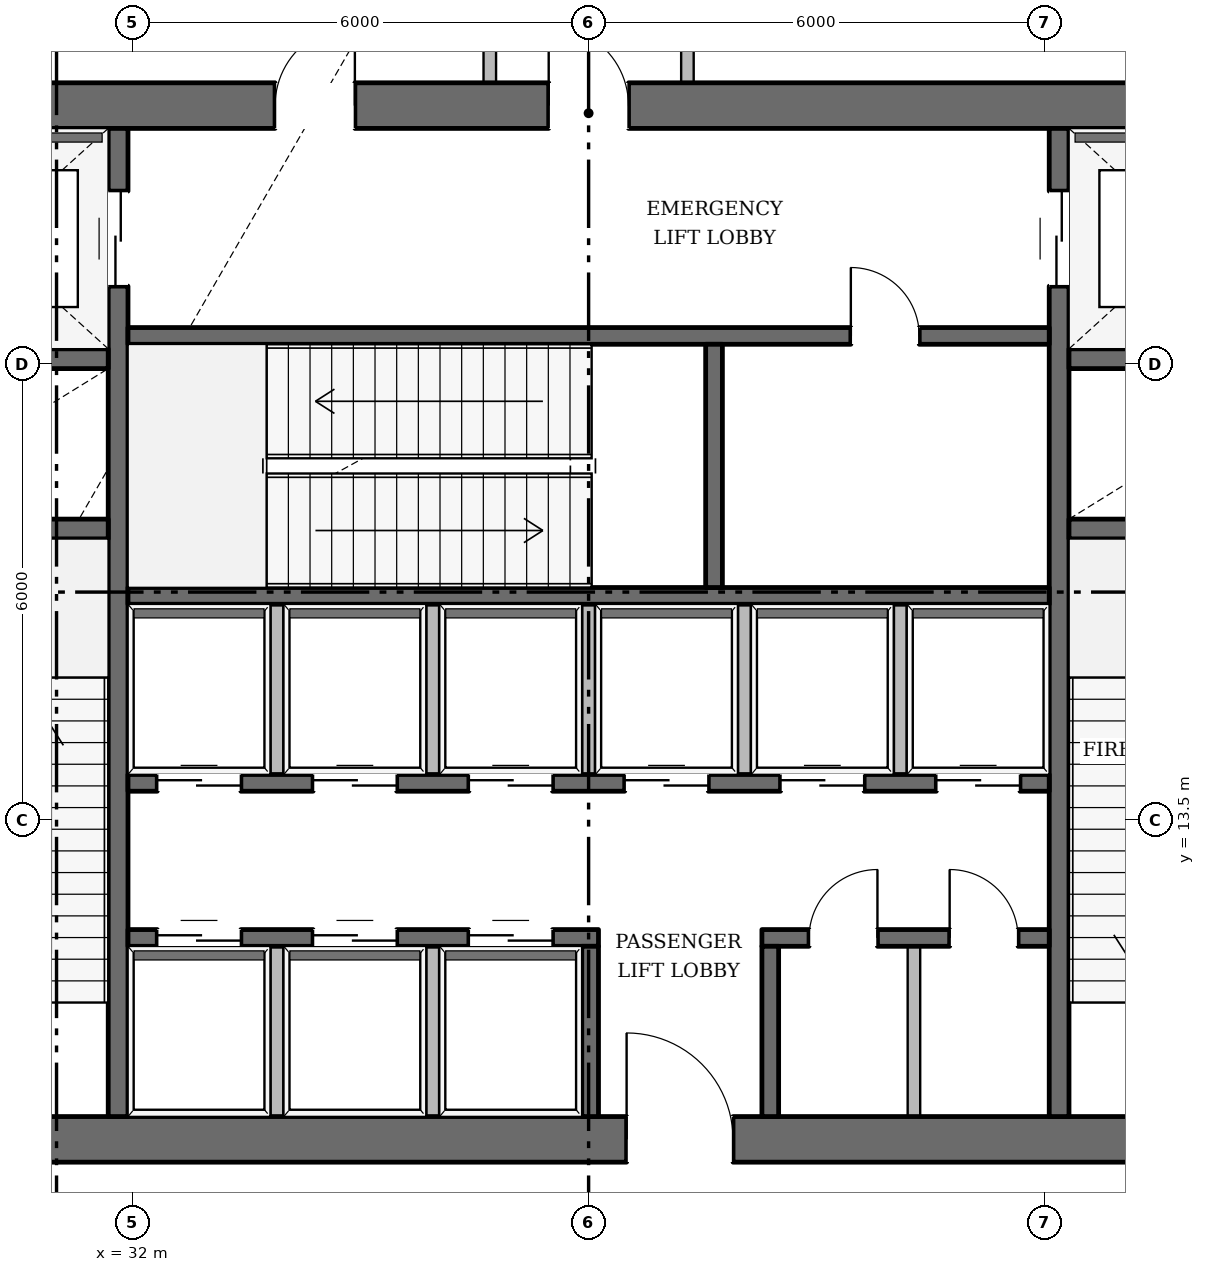
"""IFC4 building model, lengths in metres.
Left out: names, types, materials, properties, quantities, classifications, styles, units other than length and angle.
Written with IfcOpenShell. Run it as: python <this file> out.ifc"""

import sys

from ifc_helpers import new_model, si_unit, direction, frame, frame_2d, origin, place, context, subcontext, project, spatial, rectangle, extrude, element, fill, save


model = new_model("IFC4")
c1 = context("Model", 3, precision=1e-05, world=origin(), true_north=direction((0.0, 1.0)))
c2 = subcontext(c1, "Body", "Model", "MODEL_VIEW")
j1 = project(units=[si_unit("LENGTHUNIT", "METRE"), si_unit("PLANEANGLEUNIT", "RADIAN")], contexts=[c1])
p1 = place(None, origin())
s1 = spatial("IfcSite", under=j1, at=p1, CompositionType="ELEMENT")
p2 = place(p1, origin())
s2 = spatial("IfcBuilding", under=s1, at=p2, CompositionType="ELEMENT")
p3 = place(p2, origin())
s3 = spatial("IfcBuildingStorey", under=s2, at=p3, CompositionType="ELEMENT", Elevation=0.0)
p4 = place(p3, frame((27.88, 9.3, 0.0), z_axis=(0.0, 0.0, 1.0), x_axis=(1.0, 0.0, 0.0)))
e1 = element("IfcWall", 1, at=p4, inside=s3, PredefinedType="SOLIDWALL", context=c2, shape_type="SweptSolid", body=[
    extrude(rectangle(XDim=20.24, YDim=0.6, at=frame_2d((10.12, 0.0))), origin(), (0.0, 0.0, 1.0), 5.74),
])
p5 = place(p4, frame((10.62, 0.0, 0.0)))
e2 = element("IfcOpeningElement", 2, at=p5, cuts=e1, PredefinedType="OPENING", context=c2, shape_type="SweptSolid", body=[
    extrude(rectangle(XDim=1.4, YDim=2.2, at=frame_2d((0.7, 1.1))), frame((0.0, 0.31, 0.0), z_axis=(0.0, -1.0, 0.0), x_axis=(1.0, 0.0, 0.0)), (0.0, 0.0, 1.0), 0.62),
])
p6 = place(p3, frame((27.88, 22.9, 0.0), z_axis=(0.0, 0.0, 1.0), x_axis=(1.0, 0.0, 0.0)))
e3 = element("IfcWall", 3, at=p6, inside=s3, PredefinedType="SOLIDWALL", context=c2, shape_type="SweptSolid", body=[
    extrude(rectangle(XDim=20.24, YDim=0.6, at=frame_2d((10.12, 0.0))), origin(), (0.0, 0.0, 1.0), 5.74),
])
p7 = place(p6, frame((9.595, 0.0, 0.0)))
e4 = element("IfcOpeningElement", 4, at=p7, cuts=e3, PredefinedType="OPENING", context=c2, shape_type="SweptSolid", body=[
    extrude(rectangle(XDim=1.05, YDim=2.15, at=frame_2d((0.525, 1.075))), frame((0.0, 0.31, 0.0), z_axis=(0.0, -1.0, 0.0), x_axis=(1.0, 0.0, 0.0)), (0.0, 0.0, 1.0), 0.62),
])
p8 = place(p6, frame((5.995, 0.0, 0.0)))
e5 = element("IfcOpeningElement", 5, at=p8, cuts=e3, PredefinedType="OPENING", context=c2, shape_type="SweptSolid", body=[
    extrude(rectangle(XDim=1.05, YDim=2.15, at=frame_2d((0.525, 1.075))), frame((0.0, 0.31, 0.0), z_axis=(0.0, -1.0, 0.0), x_axis=(1.0, 0.0, 0.0)), (0.0, 0.0, 1.0), 0.62),
])
p9 = place(p3, frame((31.81, 9.6, 0.0), z_axis=(0.0, 0.0, 1.0), x_axis=(0.0, 1.0, 0.0)))
e6 = element("IfcWall", 6, at=p9, inside=s3, PredefinedType="SHEAR", context=c2, shape_type="SweptSolid", body=[
    extrude(rectangle(XDim=13.0, YDim=0.26, at=frame_2d((6.5, 0.0))), origin(), (0.0, 0.0, 1.0), 5.74),
])
p10 = place(p9, frame((10.925, 0.0, 0.0)))
e7 = element("IfcOpeningElement", 7, at=p10, cuts=e6, PredefinedType="OPENING", context=c2, shape_type="SweptSolid", body=[
    extrude(rectangle(XDim=1.25, YDim=2.25, at=frame_2d((0.625, 1.125))), frame((0.0, 0.14, 0.0), z_axis=(0.0, -1.0, 0.0), x_axis=(1.0, 0.0, 0.0)), (0.0, 0.0, 1.0), 0.28),
])
p11 = place(p3, frame((44.19, 9.6, 0.0), z_axis=(0.0, 0.0, 1.0), x_axis=(0.0, 1.0, 0.0)))
e8 = element("IfcWall", 8, at=p11, inside=s3, PredefinedType="SHEAR", context=c2, shape_type="SweptSolid", body=[
    extrude(rectangle(XDim=13.0, YDim=0.26, at=frame_2d((6.5, 0.0))), origin(), (0.0, 0.0, 1.0), 5.74),
])
p12 = place(p11, frame((10.925, 0.0, 0.0)))
e9 = element("IfcOpeningElement", 9, at=p12, cuts=e8, PredefinedType="OPENING", context=c2, shape_type="SweptSolid", body=[
    extrude(rectangle(XDim=1.25, YDim=2.25, at=frame_2d((0.625, 1.125))), frame((0.0, 0.14, 0.0), z_axis=(0.0, -1.0, 0.0), x_axis=(1.0, 0.0, 0.0)), (0.0, 0.0, 1.0), 0.28),
])
for number, where, z_axis, x_axis in (
    (10, (28.48, 17.33, 0.0), (0.0, 0.0, 1.0), (1.0, 0.0, 0.0)),
    (11, (28.48, 19.57, 0.0), (0.0, 0.0, 1.0), (1.0, 0.0, 0.0)),
    (12, (44.32, 17.33, 0.0), (0.0, 0.0, 1.0), (1.0, 0.0, 0.0)),
    (13, (44.32, 19.57, 0.0), (0.0, 0.0, 1.0), (1.0, 0.0, 0.0)),
):
    element("IfcWall", number, at=place(p3, frame(where, z_axis=z_axis, x_axis=x_axis)), inside=s3, PredefinedType="SHEAR", context=c2, shape_type="SweptSolid", body=[
        extrude(rectangle(XDim=3.2, YDim=0.26, at=frame_2d((1.6, 0.0))), origin(), (0.0, 0.0, 1.0), 5.74),
    ])
p13 = place(p3, frame((31.94, 19.87, 0.0), z_axis=(0.0, 0.0, 1.0), x_axis=(1.0, 0.0, 0.0)))
e14 = element("IfcWall", 14, at=p13, inside=s3, PredefinedType="SOLIDWALL", context=c2, shape_type="SweptSolid", body=[
    extrude(rectangle(XDim=12.12, YDim=0.22, at=frame_2d((6.06, 0.0))), origin(), (0.0, 0.0, 1.0), 5.74),
])
p14 = place(p13, frame((9.51, 0.0, 0.0)))
e15 = element("IfcOpeningElement", 15, at=p14, cuts=e14, PredefinedType="OPENING", context=c2, shape_type="SweptSolid", body=[
    extrude(rectangle(XDim=0.9, YDim=2.1, at=frame_2d((0.45, 1.05))), frame((0.0, 0.12, 0.0), z_axis=(0.0, -1.0, 0.0), x_axis=(1.0, 0.0, 0.0)), (0.0, 0.0, 1.0), 0.24),
])
p15 = place(p3, frame((31.94, 16.45, 0.0), z_axis=(0.0, 0.0, 1.0), x_axis=(1.0, 0.0, 0.0)))
e16 = element("IfcWall", 16, at=p15, inside=s3, PredefinedType="SOLIDWALL", context=c2, shape_type="SweptSolid", body=[
    extrude(rectangle(XDim=12.12, YDim=0.22, at=frame_2d((6.06, 0.0))), origin(), (0.0, 0.0, 1.0), 5.74),
])
p16 = place(p3, frame((39.65, 16.56, 0.0), z_axis=(0.0, 0.0, 1.0), x_axis=(0.0, 1.0, 0.0)))
e17 = element("IfcWall", 17, at=p16, inside=s3, PredefinedType="SOLIDWALL", context=c2, shape_type="SweptSolid", body=[
    extrude(rectangle(XDim=3.2, YDim=0.22, at=frame_2d((1.6, 0.0))), origin(), (0.0, 0.0, 1.0), 5.74),
])
p17 = place(p3, frame((31.94, 13.99, 0.0), z_axis=(0.0, 0.0, 1.0), x_axis=(1.0, 0.0, 0.0)))
e18 = element("IfcWall", 18, at=p17, inside=s3, PredefinedType="SOLIDWALL", context=c2, shape_type="SweptSolid", body=[
    extrude(rectangle(XDim=12.12, YDim=0.22, at=frame_2d((6.06, 0.0))), origin(), (0.0, 0.0, 1.0), 5.74),
])
p18 = place(p17, frame((0.385, 0.0, 0.0)))
e19 = element("IfcOpeningElement", 19, at=p18, cuts=e18, PredefinedType="OPENING", context=c2, shape_type="SweptSolid", body=[
    extrude(rectangle(XDim=1.1, YDim=2.2, at=frame_2d((0.55, 1.1))), frame((0.0, 0.12, 0.0), z_axis=(0.0, -1.0, 0.0), x_axis=(1.0, 0.0, 0.0)), (0.0, 0.0, 1.0), 0.24),
])
p19 = place(p17, frame((2.435, 0.0, 0.0)))
e20 = element("IfcOpeningElement", 20, at=p19, cuts=e18, PredefinedType="OPENING", context=c2, shape_type="SweptSolid", body=[
    extrude(rectangle(XDim=1.1, YDim=2.2, at=frame_2d((0.55, 1.1))), frame((0.0, 0.12, 0.0), z_axis=(0.0, -1.0, 0.0), x_axis=(1.0, 0.0, 0.0)), (0.0, 0.0, 1.0), 0.24),
])
p20 = place(p17, frame((4.485, 0.0, 0.0)))
e21 = element("IfcOpeningElement", 21, at=p20, cuts=e18, PredefinedType="OPENING", context=c2, shape_type="SweptSolid", body=[
    extrude(rectangle(XDim=1.1, YDim=2.2, at=frame_2d((0.55, 1.1))), frame((0.0, 0.12, 0.0), z_axis=(0.0, -1.0, 0.0), x_axis=(1.0, 0.0, 0.0)), (0.0, 0.0, 1.0), 0.24),
])
p21 = place(p17, frame((6.535, 0.0, 0.0)))
e22 = element("IfcOpeningElement", 22, at=p21, cuts=e18, PredefinedType="OPENING", context=c2, shape_type="SweptSolid", body=[
    extrude(rectangle(XDim=1.1, YDim=2.2, at=frame_2d((0.55, 1.1))), frame((0.0, 0.12, 0.0), z_axis=(0.0, -1.0, 0.0), x_axis=(1.0, 0.0, 0.0)), (0.0, 0.0, 1.0), 0.24),
])
p22 = place(p17, frame((8.585, 0.0, 0.0)))
e23 = element("IfcOpeningElement", 23, at=p22, cuts=e18, PredefinedType="OPENING", context=c2, shape_type="SweptSolid", body=[
    extrude(rectangle(XDim=1.1, YDim=2.2, at=frame_2d((0.55, 1.1))), frame((0.0, 0.12, 0.0), z_axis=(0.0, -1.0, 0.0), x_axis=(1.0, 0.0, 0.0)), (0.0, 0.0, 1.0), 0.24),
])
p23 = place(p17, frame((10.635, 0.0, 0.0)))
e24 = element("IfcOpeningElement", 24, at=p23, cuts=e18, PredefinedType="OPENING", context=c2, shape_type="SweptSolid", body=[
    extrude(rectangle(XDim=1.1, YDim=2.2, at=frame_2d((0.55, 1.1))), frame((0.0, 0.12, 0.0), z_axis=(0.0, -1.0, 0.0), x_axis=(1.0, 0.0, 0.0)), (0.0, 0.0, 1.0), 0.24),
])
p24 = place(p3, frame((31.94, 11.95, 0.0), z_axis=(0.0, 0.0, 1.0), x_axis=(1.0, 0.0, 0.0)))
e25 = element("IfcWall", 25, at=p24, inside=s3, PredefinedType="SOLIDWALL", context=c2, shape_type="SweptSolid", body=[
    extrude(rectangle(XDim=6.19, YDim=0.22, at=frame_2d((3.095, 0.0))), origin(), (0.0, 0.0, 1.0), 5.74),
])
p25 = place(p24, frame((0.385, 0.0, 0.0)))
e26 = element("IfcOpeningElement", 26, at=p25, cuts=e25, PredefinedType="OPENING", context=c2, shape_type="SweptSolid", body=[
    extrude(rectangle(XDim=1.1, YDim=2.2, at=frame_2d((0.55, 1.1))), frame((0.0, 0.12, 0.0), z_axis=(0.0, -1.0, 0.0), x_axis=(1.0, 0.0, 0.0)), (0.0, 0.0, 1.0), 0.24),
])
p26 = place(p24, frame((2.435, 0.0, 0.0)))
e27 = element("IfcOpeningElement", 27, at=p26, cuts=e25, PredefinedType="OPENING", context=c2, shape_type="SweptSolid", body=[
    extrude(rectangle(XDim=1.1, YDim=2.2, at=frame_2d((0.55, 1.1))), frame((0.0, 0.12, 0.0), z_axis=(0.0, -1.0, 0.0), x_axis=(1.0, 0.0, 0.0)), (0.0, 0.0, 1.0), 0.24),
])
p27 = place(p24, frame((4.485, 0.0, 0.0)))
e28 = element("IfcOpeningElement", 28, at=p27, cuts=e25, PredefinedType="OPENING", context=c2, shape_type="SweptSolid", body=[
    extrude(rectangle(XDim=1.1, YDim=2.2, at=frame_2d((0.55, 1.1))), frame((0.0, 0.12, 0.0), z_axis=(0.0, -1.0, 0.0), x_axis=(1.0, 0.0, 0.0)), (0.0, 0.0, 1.0), 0.24),
])
p28 = place(p3, frame((40.28, 11.95, 0.0), z_axis=(0.0, 0.0, 1.0), x_axis=(1.0, 0.0, 0.0)))
e29 = element("IfcWall", 29, at=p28, inside=s3, PredefinedType="SOLIDWALL", context=c2, shape_type="SweptSolid", body=[
    extrude(rectangle(XDim=3.78, YDim=0.22, at=frame_2d((1.89, 0.0))), origin(), (0.0, 0.0, 1.0), 5.74),
])
p29 = place(p28, frame((0.62, 0.0, 0.0)))
e30 = element("IfcOpeningElement", 30, at=p29, cuts=e29, PredefinedType="OPENING", context=c2, shape_type="SweptSolid", body=[
    extrude(rectangle(XDim=0.9, YDim=2.1, at=frame_2d((0.45, 1.05))), frame((0.0, 0.12, 0.0), z_axis=(0.0, -1.0, 0.0), x_axis=(1.0, 0.0, 0.0)), (0.0, 0.0, 1.0), 0.24),
])
p30 = place(p28, frame((2.47, 0.0, 0.0)))
e31 = element("IfcOpeningElement", 31, at=p30, cuts=e29, PredefinedType="OPENING", context=c2, shape_type="SweptSolid", body=[
    extrude(rectangle(XDim=0.9, YDim=2.1, at=frame_2d((0.45, 1.05))), frame((0.0, 0.12, 0.0), z_axis=(0.0, -1.0, 0.0), x_axis=(1.0, 0.0, 0.0)), (0.0, 0.0, 1.0), 0.24),
])
for number, where, z_axis, x_axis in (
    (32, (38.02, 9.6, 0.0), (0.0, 0.0, 1.0), (0.0, 1.0, 0.0)),
    (33, (40.39, 9.6, 0.0), (0.0, 0.0, 1.0), (0.0, 1.0, 0.0)),
):
    element("IfcWall", number, at=place(p3, frame(where, z_axis=z_axis, x_axis=x_axis)), inside=s3, PredefinedType="SOLIDWALL", context=c2, shape_type="SweptSolid", body=[
        extrude(rectangle(XDim=2.24, YDim=0.22, at=frame_2d((1.12, 0.0))), origin(), (0.0, 0.0, 1.0), 5.74),
    ])
for number, where, z_axis, x_axis in (
    (34, (33.9, 9.6, 0.0), (0.0, 0.0, 1.0), (0.0, 1.0, 0.0)),
    (35, (35.95, 9.6, 0.0), (0.0, 0.0, 1.0), (0.0, 1.0, 0.0)),
    (36, (33.9, 14.1, 0.0), (0.0, 0.0, 1.0), (0.0, 1.0, 0.0)),
    (37, (35.95, 14.1, 0.0), (0.0, 0.0, 1.0), (0.0, 1.0, 0.0)),
    (38, (38.0, 14.1, 0.0), (0.0, 0.0, 1.0), (0.0, 1.0, 0.0)),
    (39, (40.05, 14.1, 0.0), (0.0, 0.0, 1.0), (0.0, 1.0, 0.0)),
    (40, (42.1, 14.1, 0.0), (0.0, 0.0, 1.0), (0.0, 1.0, 0.0)),
    (41, (42.28, 9.6, 0.0), (0.0, 0.0, 1.0), (0.0, 1.0, 0.0)),
):
    element("IfcWall", number, at=place(p3, frame(where, z_axis=z_axis, x_axis=x_axis)), inside=s3, PredefinedType="PARTITIONING", context=c2, shape_type="SweptSolid", body=[
        extrude(rectangle(XDim=2.24, YDim=0.165, at=frame_2d((1.12, 0.0))), origin(), (0.0, 0.0, 1.0), 5.74),
    ])
p31 = place(p3, frame((36.7, 23.2, 0.0), z_axis=(0.0, 0.0, 1.0), x_axis=(0.0, 1.0, 0.0)))
e42 = element("IfcWall", 42, at=p31, inside=s3, PredefinedType="PARTITIONING", context=c2, shape_type="SweptSolid", body=[
    extrude(rectangle(XDim=20.216, YDim=0.165, at=frame_2d((10.108, 0.0))), origin(), (0.0, 0.0, 1.0), 5.74),
])
p32 = place(p31, frame((3.775, 0.0, 0.0)))
e43 = element("IfcOpeningElement", 43, at=p32, cuts=e42, PredefinedType="OPENING", context=c2, shape_type="SweptSolid", body=[
    extrude(rectangle(XDim=1.05, YDim=2.15, at=frame_2d((0.525, 1.075))), frame((0.0, 0.093, 0.0), z_axis=(0.0, -1.0, 0.0), x_axis=(1.0, 0.0, 0.0)), (0.0, 0.0, 1.0), 0.185),
])
p33 = place(p3, frame((39.3, 43.416, 0.0), z_axis=(0.0, 0.0, 1.0), x_axis=(0.0, -1.0, 0.0)))
e44 = element("IfcWall", 44, at=p33, inside=s3, PredefinedType="PARTITIONING", context=c2, shape_type="SweptSolid", body=[
    extrude(rectangle(XDim=20.216, YDim=0.165, at=frame_2d((10.108, 0.0))), origin(), (0.0, 0.0, 1.0), 5.74),
])
p34 = place(p33, frame((15.39, 0.0, 0.0)))
e45 = element("IfcOpeningElement", 45, at=p34, cuts=e44, PredefinedType="OPENING", context=c2, shape_type="SweptSolid", body=[
    extrude(rectangle(XDim=1.05, YDim=2.15, at=frame_2d((0.525, 1.075))), frame((0.0, 0.093, 0.0), z_axis=(0.0, -1.0, 0.0), x_axis=(1.0, 0.0, 0.0)), (0.0, 0.0, 1.0), 0.185),
])
p35 = place(p10, origin())
e46 = element("IfcDoor", 46, at=p35, inside=s3, OperationType="DOUBLE_DOOR_SLIDING", PredefinedType="DOOR", context=c2, shape_type="SweptSolid", body=[
    extrude(rectangle(XDim=1.25, YDim=2.25, at=frame_2d((0.625, 1.125))), frame((0.0, 0.025, 0.0), z_axis=(0.0, -1.0, 0.0), x_axis=(1.0, 0.0, 0.0)), (0.0, 0.0, 1.0), 0.05),
])
fill(e7, e46)
p36 = place(p12, origin())
e47 = element("IfcDoor", 47, at=p36, inside=s3, OperationType="DOUBLE_DOOR_SLIDING", PredefinedType="DOOR", context=c2, shape_type="SweptSolid", body=[
    extrude(rectangle(XDim=1.25, YDim=2.25, at=frame_2d((0.625, 1.125))), frame((0.0, 0.025, 0.0), z_axis=(0.0, -1.0, 0.0), x_axis=(1.0, 0.0, 0.0)), (0.0, 0.0, 1.0), 0.05),
])
fill(e9, e47)
p37 = place(p5, origin())
e48 = element("IfcDoor", 48, at=p37, inside=s3, OperationType="SINGLE_SWING_LEFT", PredefinedType="DOOR", context=c2, shape_type="SweptSolid", body=[
    extrude(rectangle(XDim=1.4, YDim=2.2, at=frame_2d((0.7, 1.1))), frame((0.0, 0.025, 0.0), z_axis=(0.0, -1.0, 0.0), x_axis=(1.0, 0.0, 0.0)), (0.0, 0.0, 1.0), 0.05),
])
fill(e2, e48)
p38 = place(p25, origin())
e49 = element("IfcDoor", 49, at=p38, inside=s3, OperationType="DOUBLE_DOOR_SLIDING", PredefinedType="DOOR", context=c2, shape_type="SweptSolid", body=[
    extrude(rectangle(XDim=1.1, YDim=2.2, at=frame_2d((0.55, 1.1))), frame((0.0, 0.025, 0.0), z_axis=(0.0, -1.0, 0.0), x_axis=(1.0, 0.0, 0.0)), (0.0, 0.0, 1.0), 0.05),
])
fill(e26, e49)
p39 = place(p26, origin())
e50 = element("IfcDoor", 50, at=p39, inside=s3, OperationType="DOUBLE_DOOR_SLIDING", PredefinedType="DOOR", context=c2, shape_type="SweptSolid", body=[
    extrude(rectangle(XDim=1.1, YDim=2.2, at=frame_2d((0.55, 1.1))), frame((0.0, 0.025, 0.0), z_axis=(0.0, -1.0, 0.0), x_axis=(1.0, 0.0, 0.0)), (0.0, 0.0, 1.0), 0.05),
])
fill(e27, e50)
p40 = place(p27, origin())
e51 = element("IfcDoor", 51, at=p40, inside=s3, OperationType="DOUBLE_DOOR_SLIDING", PredefinedType="DOOR", context=c2, shape_type="SweptSolid", body=[
    extrude(rectangle(XDim=1.1, YDim=2.2, at=frame_2d((0.55, 1.1))), frame((0.0, 0.025, 0.0), z_axis=(0.0, -1.0, 0.0), x_axis=(1.0, 0.0, 0.0)), (0.0, 0.0, 1.0), 0.05),
])
fill(e28, e51)
p41 = place(p18, origin())
e52 = element("IfcDoor", 52, at=p41, inside=s3, OperationType="DOUBLE_DOOR_SLIDING", PredefinedType="DOOR", context=c2, shape_type="SweptSolid", body=[
    extrude(rectangle(XDim=1.1, YDim=2.2, at=frame_2d((0.55, 1.1))), frame((0.0, 0.025, 0.0), z_axis=(0.0, -1.0, 0.0), x_axis=(1.0, 0.0, 0.0)), (0.0, 0.0, 1.0), 0.05),
])
fill(e19, e52)
p42 = place(p19, origin())
e53 = element("IfcDoor", 53, at=p42, inside=s3, OperationType="DOUBLE_DOOR_SLIDING", PredefinedType="DOOR", context=c2, shape_type="SweptSolid", body=[
    extrude(rectangle(XDim=1.1, YDim=2.2, at=frame_2d((0.55, 1.1))), frame((0.0, 0.025, 0.0), z_axis=(0.0, -1.0, 0.0), x_axis=(1.0, 0.0, 0.0)), (0.0, 0.0, 1.0), 0.05),
])
fill(e20, e53)
p43 = place(p20, origin())
e54 = element("IfcDoor", 54, at=p43, inside=s3, OperationType="DOUBLE_DOOR_SLIDING", PredefinedType="DOOR", context=c2, shape_type="SweptSolid", body=[
    extrude(rectangle(XDim=1.1, YDim=2.2, at=frame_2d((0.55, 1.1))), frame((0.0, 0.025, 0.0), z_axis=(0.0, -1.0, 0.0), x_axis=(1.0, 0.0, 0.0)), (0.0, 0.0, 1.0), 0.05),
])
fill(e21, e54)
p44 = place(p21, origin())
e55 = element("IfcDoor", 55, at=p44, inside=s3, OperationType="DOUBLE_DOOR_SLIDING", PredefinedType="DOOR", context=c2, shape_type="SweptSolid", body=[
    extrude(rectangle(XDim=1.1, YDim=2.2, at=frame_2d((0.55, 1.1))), frame((0.0, 0.025, 0.0), z_axis=(0.0, -1.0, 0.0), x_axis=(1.0, 0.0, 0.0)), (0.0, 0.0, 1.0), 0.05),
])
fill(e22, e55)
p45 = place(p22, origin())
e56 = element("IfcDoor", 56, at=p45, inside=s3, OperationType="DOUBLE_DOOR_SLIDING", PredefinedType="DOOR", context=c2, shape_type="SweptSolid", body=[
    extrude(rectangle(XDim=1.1, YDim=2.2, at=frame_2d((0.55, 1.1))), frame((0.0, 0.025, 0.0), z_axis=(0.0, -1.0, 0.0), x_axis=(1.0, 0.0, 0.0)), (0.0, 0.0, 1.0), 0.05),
])
fill(e23, e56)
p46 = place(p23, origin())
e57 = element("IfcDoor", 57, at=p46, inside=s3, OperationType="DOUBLE_DOOR_SLIDING", PredefinedType="DOOR", context=c2, shape_type="SweptSolid", body=[
    extrude(rectangle(XDim=1.1, YDim=2.2, at=frame_2d((0.55, 1.1))), frame((0.0, 0.025, 0.0), z_axis=(0.0, -1.0, 0.0), x_axis=(1.0, 0.0, 0.0)), (0.0, 0.0, 1.0), 0.05),
])
fill(e24, e57)
p47 = place(p14, origin())
e58 = element("IfcDoor", 58, at=p47, inside=s3, OperationType="SINGLE_SWING_LEFT", PredefinedType="DOOR", context=c2, shape_type="SweptSolid", body=[
    extrude(rectangle(XDim=0.9, YDim=2.1, at=frame_2d((0.45, 1.05))), frame((0.0, 0.025, 0.0), z_axis=(0.0, -1.0, 0.0), x_axis=(1.0, 0.0, 0.0)), (0.0, 0.0, 1.0), 0.05),
])
fill(e15, e58)
p48 = place(p29, origin())
e59 = element("IfcDoor", 59, at=p48, inside=s3, OperationType="SINGLE_SWING_RIGHT", PredefinedType="DOOR", context=c2, shape_type="SweptSolid", body=[
    extrude(rectangle(XDim=0.9, YDim=2.1, at=frame_2d((0.45, 1.05))), frame((0.0, 0.025, 0.0), z_axis=(0.0, -1.0, 0.0), x_axis=(1.0, 0.0, 0.0)), (0.0, 0.0, 1.0), 0.05),
])
fill(e30, e59)
p49 = place(p30, origin())
e60 = element("IfcDoor", 60, at=p49, inside=s3, OperationType="SINGLE_SWING_LEFT", PredefinedType="DOOR", context=c2, shape_type="SweptSolid", body=[
    extrude(rectangle(XDim=0.9, YDim=2.1, at=frame_2d((0.45, 1.05))), frame((0.0, 0.025, 0.0), z_axis=(0.0, -1.0, 0.0), x_axis=(1.0, 0.0, 0.0)), (0.0, 0.0, 1.0), 0.05),
])
fill(e31, e60)
p50 = place(p7, origin())
e61 = element("IfcDoor", 61, at=p50, inside=s3, OperationType="SINGLE_SWING_LEFT", PredefinedType="DOOR", context=c2, shape_type="SweptSolid", body=[
    extrude(rectangle(XDim=1.05, YDim=2.15, at=frame_2d((0.525, 1.075))), frame((0.0, 0.025, 0.0), z_axis=(0.0, -1.0, 0.0), x_axis=(1.0, 0.0, 0.0)), (0.0, 0.0, 1.0), 0.05),
])
fill(e4, e61)
p51 = place(p8, origin())
e62 = element("IfcDoor", 62, at=p51, inside=s3, OperationType="SINGLE_SWING_RIGHT", PredefinedType="DOOR", context=c2, shape_type="SweptSolid", body=[
    extrude(rectangle(XDim=1.05, YDim=2.15, at=frame_2d((0.525, 1.075))), frame((0.0, 0.025, 0.0), z_axis=(0.0, -1.0, 0.0), x_axis=(1.0, 0.0, 0.0)), (0.0, 0.0, 1.0), 0.05),
])
fill(e5, e62)
save(model, sys.argv[1])
